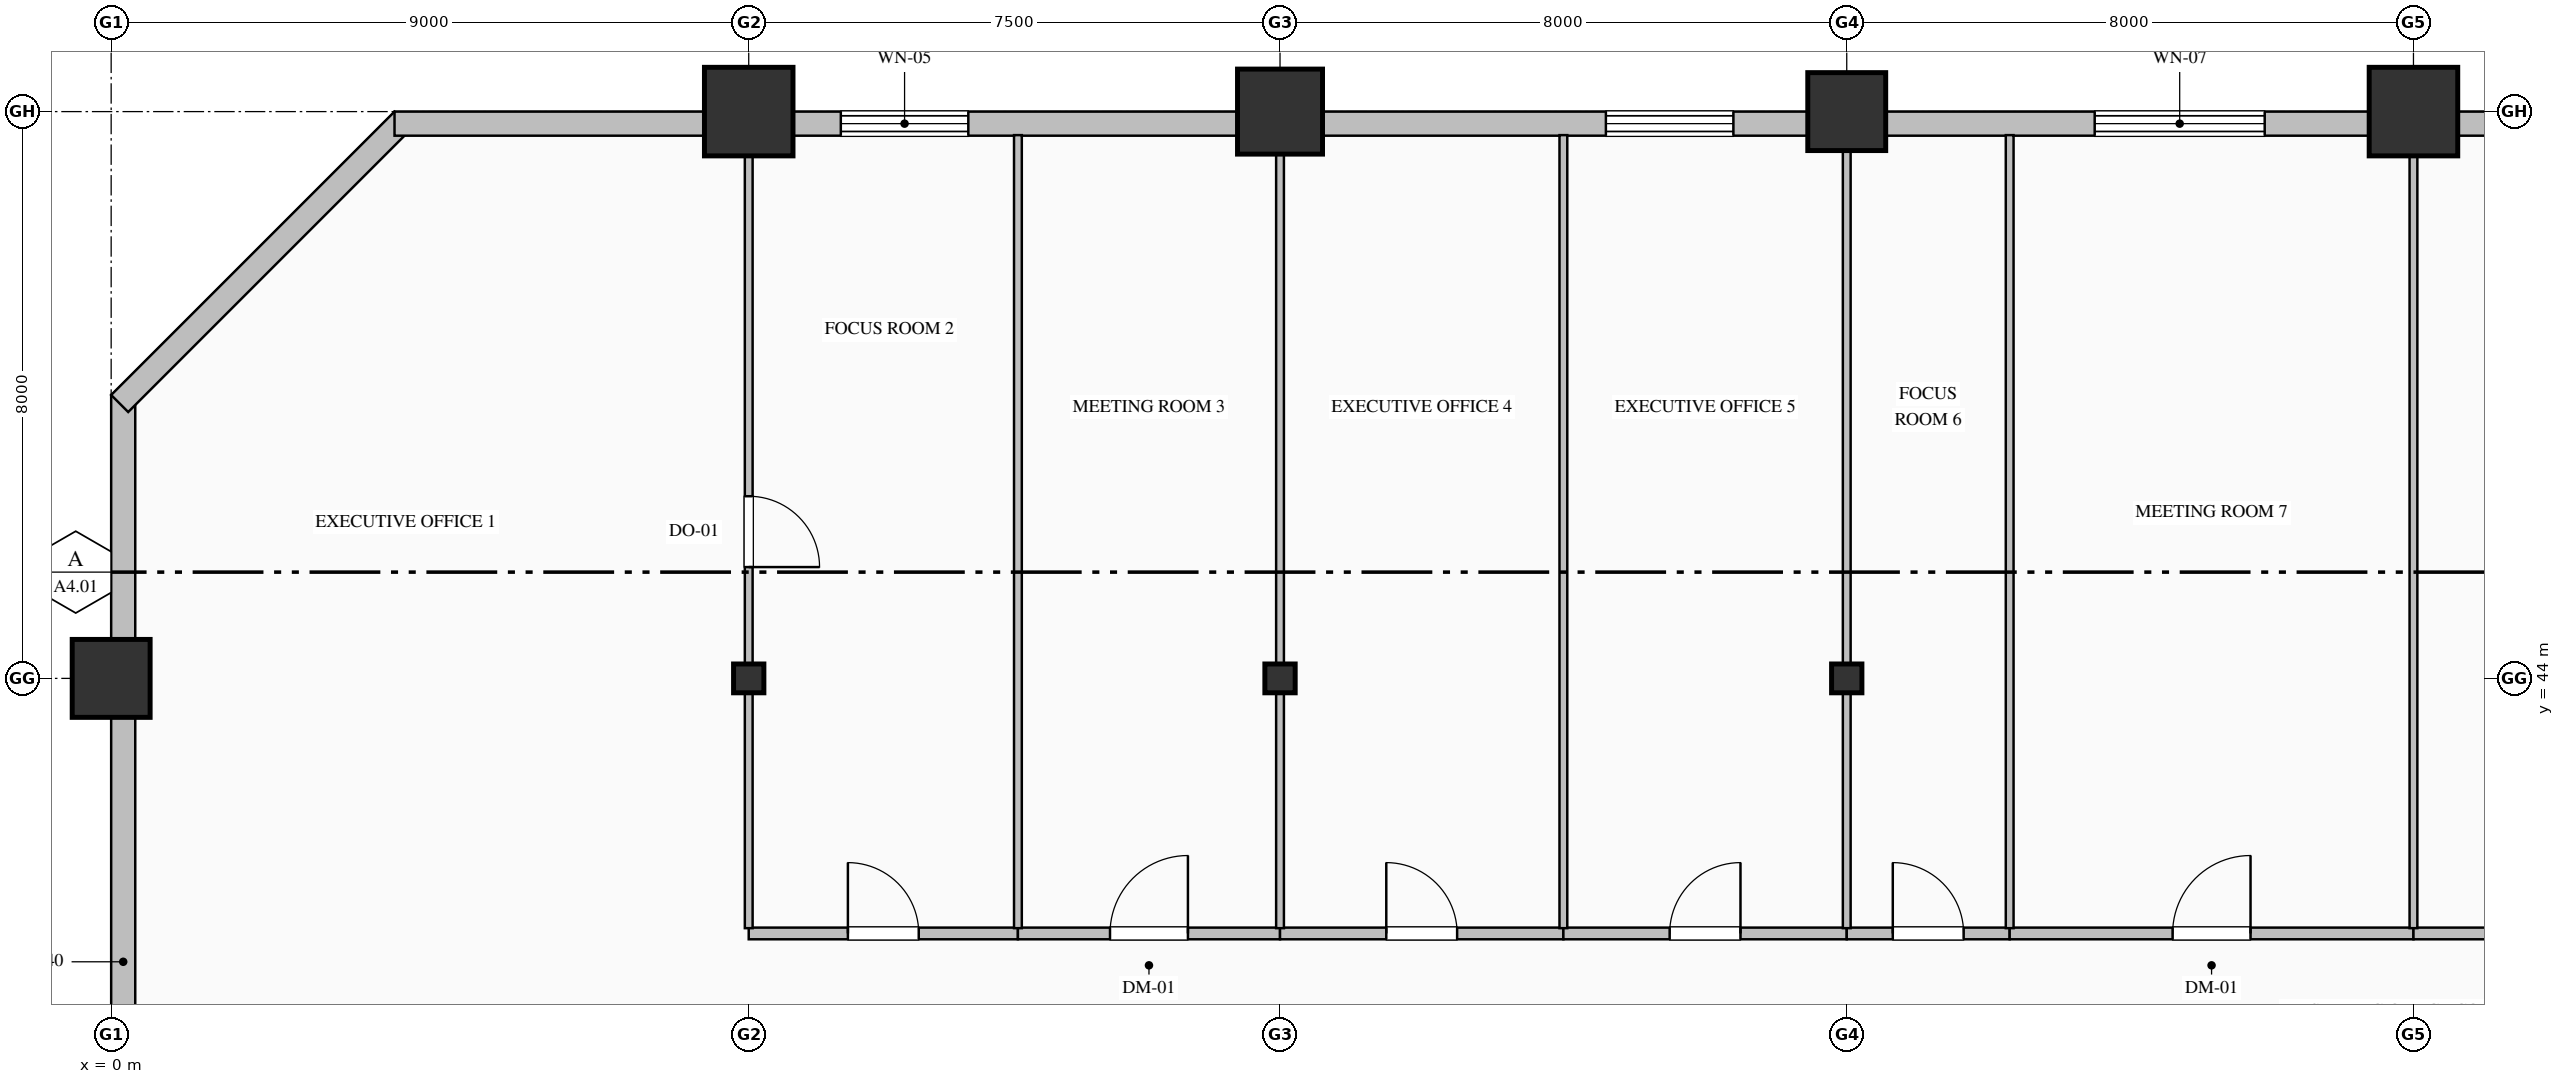
"""IFC4 building model, lengths in metres.
Left out: names, types, materials, properties, quantities, classifications, styles, units other than length and angle.
Written with IfcOpenShell. Run it as: python <this file> out.ifc"""

import sys

from ifc_helpers import new_model, si_unit, direction, frame, frame_2d, origin, origin_2d, place, context, subcontext, project, spatial, rectangle, hollow_rectangle, hollow_circle, i_section, extrude, element, fill, save


model = new_model("IFC4")
c1 = context("Model", 3, precision=1e-05, world=origin(), true_north=direction((0.0, 1.0)))
c2 = subcontext(c1, "Body", "Model", "MODEL_VIEW")
j1 = project(units=[si_unit("LENGTHUNIT", "METRE"), si_unit("PLANEANGLEUNIT", "RADIAN")], contexts=[c1])
p1 = place(None, origin())
s1 = spatial("IfcSite", under=j1, at=p1, CompositionType="ELEMENT")
p2 = place(p1, origin())
s2 = spatial("IfcBuilding", under=s1, at=p2, CompositionType="ELEMENT")
p3 = place(p2, frame((0.0, 0.0, 40.2)))
s3 = spatial("IfcBuildingStorey", under=s2, at=p3, CompositionType="ELEMENT", Elevation=40.2)
p4 = place(p3, frame((0.0, 44.0, 0.0), z_axis=(0.0, 0.0, 1.0), x_axis=(1.0, 0.0, 0.0)))
e1 = element("IfcColumn", 1, at=p4, inside=s3, PredefinedType="COLUMN", context=c2, shape_type="SweptSolid", body=[
    extrude(hollow_rectangle(XDim=1.1, YDim=1.1, WallThickness=0.04, at=origin_2d()), origin(), (0.0, 0.0, 1.0), 4.0),
])
p5 = place(p3, frame((9.0, 44.0, 0.0), z_axis=(0.0, 0.0, 1.0), x_axis=(1.0, 0.0, 0.0)))
e2 = element("IfcColumn", 2, at=p5, inside=s3, PredefinedType="COLUMN", context=c2, shape_type="SweptSolid", body=[
    extrude(i_section(OverallWidth=0.407, OverallDepth=0.428, WebThickness=0.02, FlangeThickness=0.035, FilletRadius=0.022, at=origin_2d()), origin(), (0.0, 0.0, 1.0), 4.0),
])
p6 = place(p3, frame((9.0, 52.0, 0.0), z_axis=(0.0, 0.0, 1.0), x_axis=(1.0, 0.0, 0.0)))
e3 = element("IfcColumn", 3, at=p6, inside=s3, PredefinedType="COLUMN", context=c2, shape_type="SweptSolid", body=[
    extrude(hollow_rectangle(XDim=1.25, YDim=1.25, WallThickness=0.045, at=origin_2d()), origin(), (0.0, 0.0, 1.0), 4.0),
])
p7 = place(p3, frame((16.5, 44.0, 0.0), z_axis=(0.0, 0.0, 1.0), x_axis=(1.0, 0.0, 0.0)))
e4 = element("IfcColumn", 4, at=p7, inside=s3, PredefinedType="COLUMN", context=c2, shape_type="SweptSolid", body=[
    extrude(i_section(OverallWidth=0.407, OverallDepth=0.428, WebThickness=0.02, FlangeThickness=0.035, FilletRadius=0.022, at=origin_2d()), origin(), (0.0, 0.0, 1.0), 4.0),
])
p8 = place(p3, frame((16.5, 52.0, 0.0), z_axis=(0.0, 0.0, 1.0), x_axis=(1.0, 0.0, 0.0)))
e5 = element("IfcColumn", 5, at=p8, inside=s3, PredefinedType="COLUMN", context=c2, shape_type="SweptSolid", body=[
    extrude(hollow_circle(Radius=0.6, WallThickness=0.04, at=origin_2d()), origin(), (0.0, 0.0, 1.0), 4.0),
])
p9 = place(p3, frame((24.5, 44.0, 0.0), z_axis=(0.0, 0.0, 1.0), x_axis=(1.0, 0.0, 0.0)))
e6 = element("IfcColumn", 6, at=p9, inside=s3, PredefinedType="COLUMN", context=c2, shape_type="SweptSolid", body=[
    extrude(i_section(OverallWidth=0.407, OverallDepth=0.428, WebThickness=0.02, FlangeThickness=0.035, FilletRadius=0.022, at=origin_2d()), origin(), (0.0, 0.0, 1.0), 4.0),
])
p10 = place(p3, frame((24.5, 52.0, 0.0), z_axis=(0.0, 0.0, 1.0), x_axis=(1.0, 0.0, 0.0)))
e7 = element("IfcColumn", 7, at=p10, inside=s3, PredefinedType="COLUMN", context=c2, shape_type="SweptSolid", body=[
    extrude(hollow_rectangle(XDim=1.1, YDim=1.1, WallThickness=0.04, at=origin_2d()), origin(), (0.0, 0.0, 1.0), 4.0),
])
p11 = place(p3, frame((32.5, 52.0, 0.0), z_axis=(0.0, 0.0, 1.0), x_axis=(1.0, 0.0, 0.0)))
e8 = element("IfcColumn", 8, at=p11, inside=s3, PredefinedType="COLUMN", context=c2, shape_type="SweptSolid", body=[
    extrude(hollow_rectangle(XDim=1.25, YDim=1.25, WallThickness=0.045, at=origin_2d()), origin(), (0.0, 0.0, 1.0), 4.0),
])
p12 = place(p3, frame((0.17, 32.0, 0.0), z_axis=(0.0, 0.0, 1.0), x_axis=(0.0, 1.0, 0.0)))
e9 = element("IfcWall", 9, at=p12, inside=s3, PredefinedType="SOLIDWALL", context=c2, shape_type="SweptSolid", body=[
    extrude(rectangle(XDim=16.0, YDim=0.34, at=frame_2d((8.0, 0.0))), origin(), (0.0, 0.0, 1.0), 3.25),
])
p13 = place(p3, frame((0.12, 47.88, 0.0), z_axis=(0.0, 0.0, 1.0), x_axis=(0.707106781187, 0.707106781187, 0.0)))
e10 = element("IfcWall", 10, at=p13, inside=s3, PredefinedType="SOLIDWALL", context=c2, shape_type="SweptSolid", body=[
    extrude(rectangle(XDim=5.657, YDim=0.34, at=frame_2d((2.828, 0.0))), origin(), (0.0, 0.0, 1.0), 3.75),
])
p14 = place(p3, frame((4.0, 51.83, 0.0), z_axis=(0.0, 0.0, 1.0), x_axis=(1.0, 0.0, 0.0)))
e11 = element("IfcWall", 11, at=p14, inside=s3, PredefinedType="SOLIDWALL", context=c2, shape_type="SweptSolid", body=[
    extrude(rectangle(XDim=36.52, YDim=0.34, at=frame_2d((18.26, 0.0))), origin(), (0.0, 0.0, 1.0), 3.25),
])
p15 = place(p14, frame((6.3, 0.0, 0.85)))
e12 = element("IfcOpeningElement", 12, at=p15, cuts=e11, PredefinedType="OPENING", context=c2, shape_type="SweptSolid", body=[
    extrude(rectangle(XDim=1.8, YDim=2.05, at=frame_2d((0.9, 1.025))), frame((0.0, 0.18, 0.0), z_axis=(0.0, -1.0, 0.0), x_axis=(1.0, 0.0, 0.0)), (0.0, 0.0, 1.0), 0.36),
])
p16 = place(p14, frame((17.1, 0.0, 0.85)))
e13 = element("IfcOpeningElement", 13, at=p16, cuts=e11, PredefinedType="OPENING", context=c2, shape_type="SweptSolid", body=[
    extrude(rectangle(XDim=1.8, YDim=2.05, at=frame_2d((0.9, 1.025))), frame((0.0, 0.18, 0.0), z_axis=(0.0, -1.0, 0.0), x_axis=(1.0, 0.0, 0.0)), (0.0, 0.0, 1.0), 0.36),
])
p17 = place(p14, frame((24.0, 0.0, 0.8)))
e14 = element("IfcOpeningElement", 14, at=p17, cuts=e11, PredefinedType="OPENING", context=c2, shape_type="SweptSolid", body=[
    extrude(rectangle(XDim=2.4, YDim=2.15, at=frame_2d((1.2, 1.075))), frame((0.0, 0.18, 0.0), z_axis=(0.0, -1.0, 0.0), x_axis=(1.0, 0.0, 0.0)), (0.0, 0.0, 1.0), 0.36),
])
p18 = place(p3, frame((9.0, 40.4, 0.0), z_axis=(0.0, 0.0, 1.0), x_axis=(1.0, 0.0, 0.0)))
e15 = element("IfcWall", 15, at=p18, inside=s3, PredefinedType="PARTITIONING", context=c2, shape_type="SweptSolid", body=[
    extrude(rectangle(XDim=3.8, YDim=0.165, at=frame_2d((1.9, 0.0))), origin(), (0.0, 0.0, 1.0), 3.75),
])
p19 = place(p18, frame((1.4, 0.0, 0.0)))
e16 = element("IfcOpeningElement", 16, at=p19, cuts=e15, PredefinedType="OPENING", context=c2, shape_type="SweptSolid", body=[
    extrude(rectangle(XDim=1.0, YDim=2.15, at=frame_2d((0.5, 1.075))), frame((0.0, 0.093, 0.0), z_axis=(0.0, -1.0, 0.0), x_axis=(1.0, 0.0, 0.0)), (0.0, 0.0, 1.0), 0.185),
])
p20 = place(p3, frame((12.8, 40.4, 0.0), z_axis=(0.0, 0.0, 1.0), x_axis=(1.0, 0.0, 0.0)))
e17 = element("IfcWall", 17, at=p20, inside=s3, PredefinedType="PARTITIONING", context=c2, shape_type="SweptSolid", body=[
    extrude(rectangle(XDim=3.7, YDim=0.165, at=frame_2d((1.85, 0.0))), origin(), (0.0, 0.0, 1.0), 3.75),
])
p21 = place(p20, frame((1.3, 0.0, 0.0)))
e18 = element("IfcOpeningElement", 18, at=p21, cuts=e17, PredefinedType="OPENING", context=c2, shape_type="SweptSolid", body=[
    extrude(rectangle(XDim=1.1, YDim=2.2, at=frame_2d((0.55, 1.1))), frame((0.0, 0.093, 0.0), z_axis=(0.0, -1.0, 0.0), x_axis=(1.0, 0.0, 0.0)), (0.0, 0.0, 1.0), 0.185),
])
p22 = place(p3, frame((16.5, 40.4, 0.0), z_axis=(0.0, 0.0, 1.0), x_axis=(1.0, 0.0, 0.0)))
e19 = element("IfcWall", 19, at=p22, inside=s3, PredefinedType="PARTITIONING", context=c2, shape_type="SweptSolid", body=[
    extrude(rectangle(XDim=4.0, YDim=0.165, at=frame_2d((2.0, 0.0))), origin(), (0.0, 0.0, 1.0), 3.75),
])
p23 = place(p22, frame((1.5, 0.0, 0.0)))
e20 = element("IfcOpeningElement", 20, at=p23, cuts=e19, PredefinedType="OPENING", context=c2, shape_type="SweptSolid", body=[
    extrude(rectangle(XDim=1.0, YDim=2.15, at=frame_2d((0.5, 1.075))), frame((0.0, 0.093, 0.0), z_axis=(0.0, -1.0, 0.0), x_axis=(1.0, 0.0, 0.0)), (0.0, 0.0, 1.0), 0.185),
])
p24 = place(p3, frame((20.5, 40.4, 0.0), z_axis=(0.0, 0.0, 1.0), x_axis=(1.0, 0.0, 0.0)))
e21 = element("IfcWall", 21, at=p24, inside=s3, PredefinedType="PARTITIONING", context=c2, shape_type="SweptSolid", body=[
    extrude(rectangle(XDim=4.0, YDim=0.165, at=frame_2d((2.0, 0.0))), origin(), (0.0, 0.0, 1.0), 3.75),
])
p25 = place(p24, frame((1.5, 0.0, 0.0)))
e22 = element("IfcOpeningElement", 22, at=p25, cuts=e21, PredefinedType="OPENING", context=c2, shape_type="SweptSolid", body=[
    extrude(rectangle(XDim=1.0, YDim=2.15, at=frame_2d((0.5, 1.075))), frame((0.0, 0.093, 0.0), z_axis=(0.0, -1.0, 0.0), x_axis=(1.0, 0.0, 0.0)), (0.0, 0.0, 1.0), 0.185),
])
p26 = place(p3, frame((24.5, 40.4, 0.0), z_axis=(0.0, 0.0, 1.0), x_axis=(1.0, 0.0, 0.0)))
e23 = element("IfcWall", 23, at=p26, inside=s3, PredefinedType="PARTITIONING", context=c2, shape_type="SweptSolid", body=[
    extrude(rectangle(XDim=2.3, YDim=0.165, at=frame_2d((1.15, 0.0))), origin(), (0.0, 0.0, 1.0), 3.75),
])
p27 = place(p26, frame((0.65, 0.0, 0.0)))
e24 = element("IfcOpeningElement", 24, at=p27, cuts=e23, PredefinedType="OPENING", context=c2, shape_type="SweptSolid", body=[
    extrude(rectangle(XDim=1.0, YDim=2.15, at=frame_2d((0.5, 1.075))), frame((0.0, 0.093, 0.0), z_axis=(0.0, -1.0, 0.0), x_axis=(1.0, 0.0, 0.0)), (0.0, 0.0, 1.0), 0.185),
])
p28 = place(p3, frame((26.8, 40.4, 0.0), z_axis=(0.0, 0.0, 1.0), x_axis=(1.0, 0.0, 0.0)))
e25 = element("IfcWall", 25, at=p28, inside=s3, PredefinedType="PARTITIONING", context=c2, shape_type="SweptSolid", body=[
    extrude(rectangle(XDim=5.7, YDim=0.165, at=frame_2d((2.85, 0.0))), origin(), (0.0, 0.0, 1.0), 3.75),
])
p29 = place(p28, frame((2.3, 0.0, 0.0)))
e26 = element("IfcOpeningElement", 26, at=p29, cuts=e25, PredefinedType="OPENING", context=c2, shape_type="SweptSolid", body=[
    extrude(rectangle(XDim=1.1, YDim=2.2, at=frame_2d((0.55, 1.1))), frame((0.0, 0.093, 0.0), z_axis=(0.0, -1.0, 0.0), x_axis=(1.0, 0.0, 0.0)), (0.0, 0.0, 1.0), 0.185),
])
p30 = place(p3, frame((32.5, 40.4, 0.0), z_axis=(0.0, 0.0, 1.0), x_axis=(1.0, 0.0, 0.0)))
e27 = element("IfcWall", 27, at=p30, inside=s3, PredefinedType="PARTITIONING", context=c2, shape_type="SweptSolid", body=[
    extrude(rectangle(XDim=5.3, YDim=0.165, at=frame_2d((2.65, 0.0))), origin(), (0.0, 0.0, 1.0), 3.75),
])
p31 = place(p30, frame((2.15, 0.0, 0.0)))
e28 = element("IfcOpeningElement", 28, at=p31, cuts=e27, PredefinedType="OPENING", context=c2, shape_type="SweptSolid", body=[
    extrude(rectangle(XDim=1.0, YDim=2.15, at=frame_2d((0.5, 1.075))), frame((0.0, 0.093, 0.0), z_axis=(0.0, -1.0, 0.0), x_axis=(1.0, 0.0, 0.0)), (0.0, 0.0, 1.0), 0.185),
])
p32 = place(p3, frame((9.0, 51.668, 0.0), z_axis=(0.0, 0.0, 1.0), x_axis=(0.0, -1.0, 0.0)))
e29 = element("IfcWall", 29, at=p32, inside=s3, PredefinedType="MOVABLE", context=c2, shape_type="SweptSolid", body=[
    extrude(rectangle(XDim=11.193, YDim=0.11, at=frame_2d((5.597, 0.0))), origin(), (0.0, 0.0, 1.0), 3.042),
])
p33 = place(p32, frame((5.097, 0.0, 0.0)))
e30 = element("IfcOpeningElement", 30, at=p33, cuts=e29, PredefinedType="OPENING", context=c2, shape_type="SweptSolid", body=[
    extrude(rectangle(XDim=1.0, YDim=2.15, at=frame_2d((0.5, 1.075))), frame((0.0, 0.065, 0.0), z_axis=(0.0, -1.0, 0.0), x_axis=(1.0, 0.0, 0.0)), (0.0, 0.0, 1.0), 0.13),
])
p34 = place(p3, frame((12.8, 51.668, 0.0), z_axis=(0.0, 0.0, 1.0), x_axis=(0.0, -1.0, 0.0)))
e31 = element("IfcWall", 31, at=p34, inside=s3, PredefinedType="MOVABLE", context=c2, shape_type="SweptSolid", body=[
    extrude(rectangle(XDim=11.193, YDim=0.11, at=frame_2d((5.597, 0.0))), origin(), (0.0, 0.0, 1.0), 3.75),
])
p35 = place(p3, frame((16.5, 51.668, 0.0), z_axis=(0.0, 0.0, 1.0), x_axis=(0.0, -1.0, 0.0)))
e32 = element("IfcWall", 32, at=p35, inside=s3, PredefinedType="MOVABLE", context=c2, shape_type="SweptSolid", body=[
    extrude(rectangle(XDim=11.193, YDim=0.11, at=frame_2d((5.597, 0.0))), origin(), (0.0, 0.0, 1.0), 3.042),
])
p36 = place(p3, frame((20.5, 51.668, 0.0), z_axis=(0.0, 0.0, 1.0), x_axis=(0.0, -1.0, 0.0)))
e33 = element("IfcWall", 33, at=p36, inside=s3, PredefinedType="MOVABLE", context=c2, shape_type="SweptSolid", body=[
    extrude(rectangle(XDim=11.193, YDim=0.11, at=frame_2d((5.597, 0.0))), origin(), (0.0, 0.0, 1.0), 3.75),
])
p37 = place(p3, frame((24.5, 51.668, 0.0), z_axis=(0.0, 0.0, 1.0), x_axis=(0.0, -1.0, 0.0)))
e34 = element("IfcWall", 34, at=p37, inside=s3, PredefinedType="MOVABLE", context=c2, shape_type="SweptSolid", body=[
    extrude(rectangle(XDim=11.193, YDim=0.11, at=frame_2d((5.597, 0.0))), origin(), (0.0, 0.0, 1.0), 3.042),
])
for number, where, z_axis, x_axis in (
    (35, (26.8, 51.668, 0.0), (0.0, 0.0, 1.0), (0.0, -1.0, 0.0)),
    (36, (32.5, 51.668, 0.0), (0.0, 0.0, 1.0), (0.0, -1.0, 0.0)),
):
    element("IfcWall", number, at=place(p3, frame(where, z_axis=z_axis, x_axis=x_axis)), inside=s3, PredefinedType="MOVABLE", context=c2, shape_type="SweptSolid", body=[
        extrude(rectangle(XDim=11.193, YDim=0.11, at=frame_2d((5.597, 0.0))), origin(), (0.0, 0.0, 1.0), 3.75),
    ])
p38 = place(p15, origin())
e37 = element("IfcWindow", 37, at=p38, inside=s3, PartitioningType="TRIPLE_PANEL_VERTICAL", PredefinedType="WINDOW", context=c2, shape_type="SweptSolid", body=[
    extrude(rectangle(XDim=1.8, YDim=2.05, at=frame_2d((0.9, 1.025))), frame((0.0, 0.15, 0.0), z_axis=(0.0, -1.0, 0.0), x_axis=(1.0, 0.0, 0.0)), (0.0, 0.0, 1.0), 0.06),
])
fill(e12, e37)
p39 = place(p16, origin())
e38 = element("IfcWindow", 38, at=p39, inside=s3, PartitioningType="TRIPLE_PANEL_VERTICAL", PredefinedType="WINDOW", context=c2, shape_type="SweptSolid", body=[
    extrude(rectangle(XDim=1.8, YDim=2.05, at=frame_2d((0.9, 1.025))), frame((0.0, 0.15, 0.0), z_axis=(0.0, -1.0, 0.0), x_axis=(1.0, 0.0, 0.0)), (0.0, 0.0, 1.0), 0.06),
])
fill(e13, e38)
p40 = place(p17, origin())
e39 = element("IfcWindow", 39, at=p40, inside=s3, PartitioningType="TRIPLE_PANEL_VERTICAL", PredefinedType="WINDOW", context=c2, shape_type="SweptSolid", body=[
    extrude(rectangle(XDim=2.4, YDim=2.15, at=frame_2d((1.2, 1.075))), frame((0.0, 0.15, 0.0), z_axis=(0.0, -1.0, 0.0), x_axis=(1.0, 0.0, 0.0)), (0.0, 0.0, 1.0), 0.06),
])
fill(e14, e39)
p41 = place(p33, origin())
e40 = element("IfcDoor", 40, at=p41, inside=s3, OperationType="SINGLE_SWING_RIGHT", PredefinedType="DOOR", context=c2, shape_type="SweptSolid", body=[
    extrude(rectangle(XDim=1.0, YDim=2.15, at=frame_2d((0.5, 1.075))), frame((0.0, 0.025, 0.0), z_axis=(0.0, -1.0, 0.0), x_axis=(1.0, 0.0, 0.0)), (0.0, 0.0, 1.0), 0.05),
])
fill(e30, e40)
p42 = place(p19, origin())
e41 = element("IfcDoor", 41, at=p42, inside=s3, OperationType="SINGLE_SWING_LEFT", PredefinedType="DOOR", context=c2, shape_type="SweptSolid", body=[
    extrude(rectangle(XDim=1.0, YDim=2.15, at=frame_2d((0.5, 1.075))), frame((0.0, 0.025, 0.0), z_axis=(0.0, -1.0, 0.0), x_axis=(1.0, 0.0, 0.0)), (0.0, 0.0, 1.0), 0.05),
])
fill(e16, e41)
p43 = place(p21, origin())
e42 = element("IfcDoor", 42, at=p43, inside=s3, OperationType="SINGLE_SWING_RIGHT", PredefinedType="DOOR", context=c2, shape_type="SweptSolid", body=[
    extrude(rectangle(XDim=1.1, YDim=2.2, at=frame_2d((0.55, 1.1))), frame((0.0, 0.025, 0.0), z_axis=(0.0, -1.0, 0.0), x_axis=(1.0, 0.0, 0.0)), (0.0, 0.0, 1.0), 0.05),
])
fill(e18, e42)
p44 = place(p23, origin())
e43 = element("IfcDoor", 43, at=p44, inside=s3, OperationType="SINGLE_SWING_LEFT", PredefinedType="DOOR", context=c2, shape_type="SweptSolid", body=[
    extrude(rectangle(XDim=1.0, YDim=2.15, at=frame_2d((0.5, 1.075))), frame((0.0, 0.025, 0.0), z_axis=(0.0, -1.0, 0.0), x_axis=(1.0, 0.0, 0.0)), (0.0, 0.0, 1.0), 0.05),
])
fill(e20, e43)
p45 = place(p25, origin())
e44 = element("IfcDoor", 44, at=p45, inside=s3, OperationType="SINGLE_SWING_RIGHT", PredefinedType="DOOR", context=c2, shape_type="SweptSolid", body=[
    extrude(rectangle(XDim=1.0, YDim=2.15, at=frame_2d((0.5, 1.075))), frame((0.0, 0.025, 0.0), z_axis=(0.0, -1.0, 0.0), x_axis=(1.0, 0.0, 0.0)), (0.0, 0.0, 1.0), 0.05),
])
fill(e22, e44)
p46 = place(p27, origin())
e45 = element("IfcDoor", 45, at=p46, inside=s3, OperationType="SINGLE_SWING_LEFT", PredefinedType="DOOR", context=c2, shape_type="SweptSolid", body=[
    extrude(rectangle(XDim=1.0, YDim=2.15, at=frame_2d((0.5, 1.075))), frame((0.0, 0.025, 0.0), z_axis=(0.0, -1.0, 0.0), x_axis=(1.0, 0.0, 0.0)), (0.0, 0.0, 1.0), 0.05),
])
fill(e24, e45)
p47 = place(p29, origin())
e46 = element("IfcDoor", 46, at=p47, inside=s3, OperationType="SINGLE_SWING_RIGHT", PredefinedType="DOOR", context=c2, shape_type="SweptSolid", body=[
    extrude(rectangle(XDim=1.1, YDim=2.2, at=frame_2d((0.55, 1.1))), frame((0.0, 0.025, 0.0), z_axis=(0.0, -1.0, 0.0), x_axis=(1.0, 0.0, 0.0)), (0.0, 0.0, 1.0), 0.05),
])
fill(e26, e46)
save(model, sys.argv[1])
